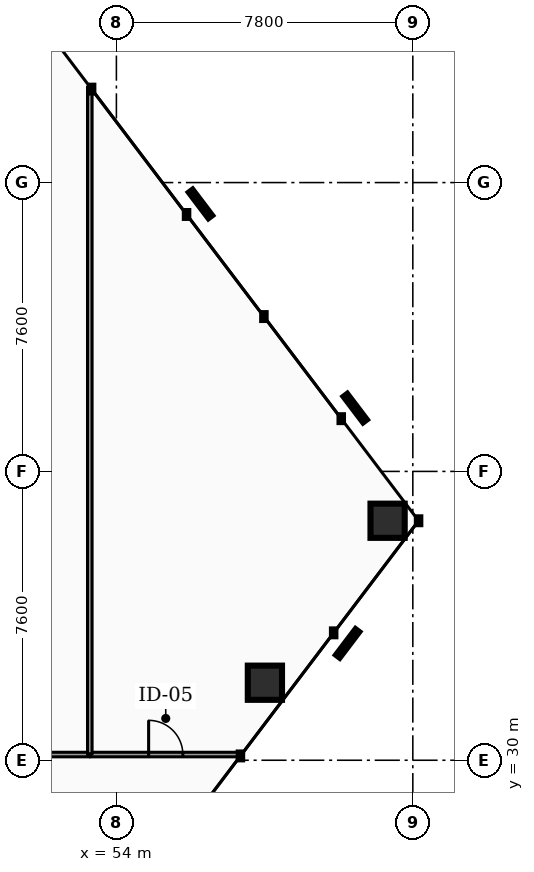
"""IFC4 building model, lengths in metres.
Left out: names, types, materials, properties, quantities, classifications, styles, units other than length and angle.
Written with IfcOpenShell. Run it as: python <this file> out.ifc"""

import sys

from ifc_helpers import new_model, si_unit, direction, frame, frame_2d, origin, origin_2d, place, context, subcontext, project, spatial, rectangle, hollow_rectangle, extrude, element, fill, save


model = new_model("IFC4")
c1 = context("Model", 3, precision=1e-05, world=origin(), true_north=direction((0.0, 1.0)))
c2 = subcontext(c1, "Body", "Model", "MODEL_VIEW")
j1 = project(units=[si_unit("LENGTHUNIT", "METRE"), si_unit("PLANEANGLEUNIT", "RADIAN")], contexts=[c1])
p1 = place(None, origin())
s1 = spatial("IfcSite", under=j1, at=p1, CompositionType="ELEMENT")
p2 = place(p1, origin())
s2 = spatial("IfcBuilding", under=s1, at=p2, CompositionType="ELEMENT")
p3 = place(p2, frame((0.0, 0.0, 76.5)))
s3 = spatial("IfcBuildingStorey", under=s2, at=p3, CompositionType="ELEMENT", Elevation=76.5)
for number, where, z_axis, x_axis in (
    (1, (57.908, 32.04, 0.0), (0.0, 0.0, 1.0), (1.0, 0.0, 0.0)),
    (2, (61.136, 36.302, 0.0), (0.0, 0.0, 1.0), (1.0, 0.0, 0.0)),
):
    element("IfcColumn", number, at=place(p3, frame(where, z_axis=z_axis, x_axis=x_axis)), inside=s3, PredefinedType="COLUMN", context=c2, shape_type="SweptSolid", body=[
        extrude(hollow_rectangle(XDim=0.9, YDim=0.9, WallThickness=0.045, at=origin_2d()), origin(), (0.0, 0.0, 1.0), 3.82),
    ])
p4 = place(p3, frame((53.32, 30.15, 0.0), z_axis=(0.0, 0.0, 1.0), x_axis=(1.0, 0.0, 0.0)))
e3 = element("IfcWall", 3, at=p4, inside=s3, PredefinedType="PARTITIONING", context=c2, shape_type="SweptSolid", body=[
    extrude(rectangle(XDim=3.956, YDim=0.12, at=frame_2d((1.978, 0.0))), origin(), (0.0, 0.0, 1.0), 2.777),
])
p5 = place(p4, frame((1.528, 0.0, 0.0)))
e4 = element("IfcOpeningElement", 4, at=p5, cuts=e3, PredefinedType="OPENING", context=c2, shape_type="SweptSolid", body=[
    extrude(rectangle(XDim=0.9, YDim=2.05, at=frame_2d((0.45, 1.025))), frame((0.0, 0.07, 0.0), z_axis=(0.0, -1.0, 0.0), x_axis=(1.0, 0.0, 0.0)), (0.0, 0.0, 1.0), 0.14),
])
p6 = place(p3, frame((50.45, 30.15, 0.0), z_axis=(0.0, 0.0, 1.0), x_axis=(1.0, 0.0, 0.0)))
e5 = element("IfcWall", 5, at=p6, inside=s3, PredefinedType="PARTITIONING", context=c2, shape_type="SweptSolid", body=[
    extrude(rectangle(XDim=2.83, YDim=0.12, at=frame_2d((1.415, 0.0))), origin(), (0.0, 0.0, 1.0), 2.777),
])
p7 = place(p3, frame((53.3, 30.17, 0.0), z_axis=(0.0, 0.0, 1.0), x_axis=(0.0, 1.0, 0.0)))
e6 = element("IfcWall", 6, at=p7, inside=s3, PredefinedType="PARTITIONING", context=c2, shape_type="SweptSolid", body=[
    extrude(rectangle(XDim=17.537, YDim=0.12, at=frame_2d((8.769, 0.0))), origin(), (0.0, 0.0, 1.0), 2.777),
])
p8 = place(p5, origin())
e7 = element("IfcDoor", 7, at=p8, inside=s3, OperationType="SINGLE_SWING_LEFT", PredefinedType="DOOR", context=c2, shape_type="SweptSolid", body=[
    extrude(rectangle(XDim=0.9, YDim=2.05, at=frame_2d((0.45, 1.025))), frame((0.0, 0.025, 0.0), z_axis=(0.0, -1.0, 0.0), x_axis=(1.0, 0.0, 0.0)), (0.0, 0.0, 1.0), 0.05),
])
fill(e4, e7)
save(model, sys.argv[1])
